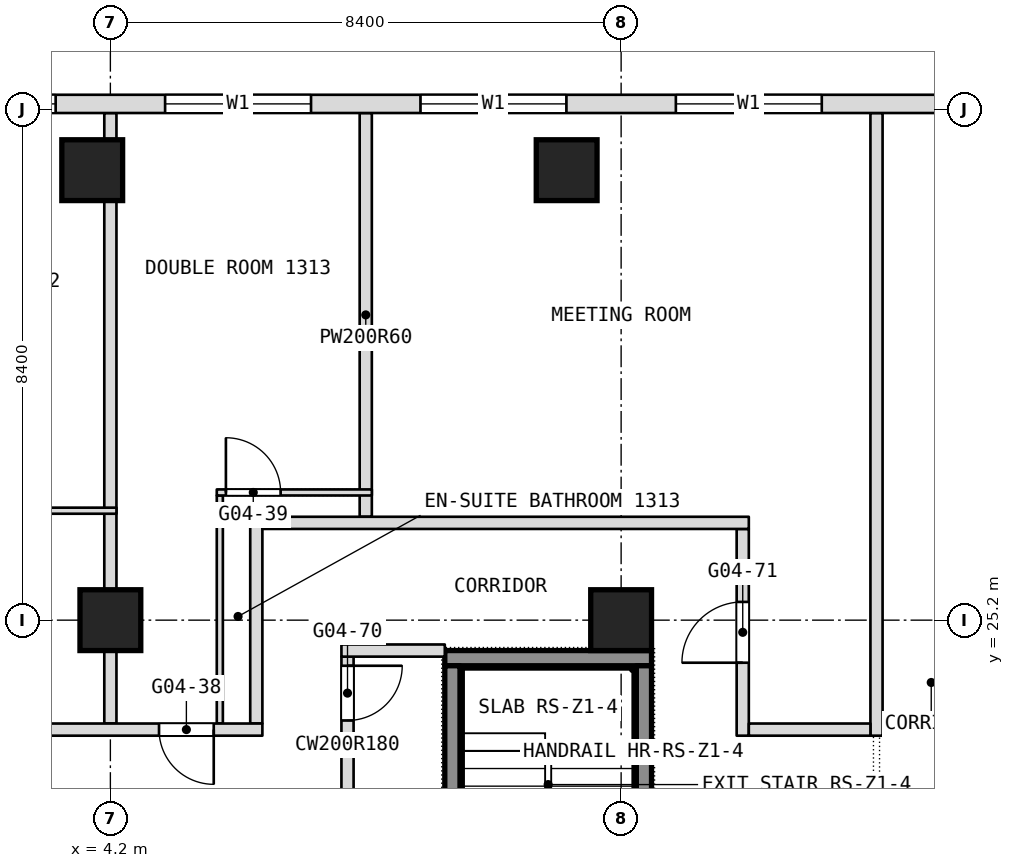
"""IFC4 building model, lengths in metres.
Left out: names, types, materials, properties, quantities, classifications, styles, units other than length and angle.
Written with IfcOpenShell. Run it as: python <this file> out.ifc"""

import sys

from ifc_helpers import new_model, si_unit, direction, frame, frame_2d, origin, origin_2d, place, context, subcontext, project, spatial, rectangle, extrude, element, fill, save


model = new_model("IFC4")
c1 = context("Model", 3, precision=1e-05, world=origin(), true_north=direction((0.0, 1.0)))
c2 = subcontext(c1, "Body", "Model", "MODEL_VIEW")
j1 = project(units=[si_unit("LENGTHUNIT", "METRE"), si_unit("PLANEANGLEUNIT", "RADIAN")], contexts=[c1])
p1 = place(None, origin())
s1 = spatial("IfcSite", under=j1, at=p1, CompositionType="ELEMENT")
p2 = place(p1, origin())
s2 = spatial("IfcBuilding", under=s1, at=p2, CompositionType="ELEMENT")
p3 = place(p2, frame((0.0, 0.0, 61.7)))
s3 = spatial("IfcBuildingStorey", under=s2, at=p3, CompositionType="ELEMENT", Elevation=61.7)
for number, where, z_axis, x_axis in (
    (1, (4.2, 25.2, 0.0), (0.0, 0.0, 1.0), (1.0, 0.0, 0.0)),
    (2, (12.6, 25.2, 0.0), (0.0, 0.0, 1.0), (1.0, 0.0, 0.0)),
    (3, (3.901, 32.6, 0.0), (0.0, 0.0, 1.0), (1.0, 0.0, 0.0)),
    (4, (11.704, 32.6, 0.0), (0.0, 0.0, 1.0), (1.0, 0.0, 0.0)),
):
    element("IfcColumn", number, at=place(p3, frame(where, z_axis=z_axis, x_axis=x_axis)), inside=s3, PredefinedType="COLUMN", context=c2, shape_type="SweptSolid", body=[
        extrude(rectangle(XDim=1.0, YDim=1.0, at=origin_2d()), origin(), (0.0, 0.0, 1.0), 3.6),
    ])
p4 = place(p3, frame((16.8, 23.3, 0.0), z_axis=(0.0, 0.0, 1.0), x_axis=(0.0, 1.0, 0.0)))
e5 = element("IfcWall", 5, at=p4, inside=s3, PredefinedType="PARTITIONING", context=c2, shape_type="SweptSolid", body=[
    extrude(rectangle(XDim=10.24, YDim=0.2, at=frame_2d((5.12, 0.0))), origin(), (0.0, 0.0, 1.0), 3.34),
])
p5 = place(p3, frame((14.6, 23.3, 0.0), z_axis=(0.0, 0.0, 1.0), x_axis=(0.0, 1.0, 0.0)))
e6 = element("IfcWall", 6, at=p5, inside=s3, PredefinedType="PARTITIONING", context=c2, shape_type="SweptSolid", body=[
    extrude(rectangle(XDim=3.4, YDim=0.2, at=frame_2d((1.7, 0.0))), origin(), (0.0, 0.0, 1.0), 3.34),
])
p6 = place(p5, frame((1.2, 0.0, 0.0)))
e7 = element("IfcOpeningElement", 7, at=p6, cuts=e6, PredefinedType="OPENING", context=c2, shape_type="SweptSolid", body=[
    extrude(rectangle(XDim=1.0, YDim=2.1, at=frame_2d((0.5, 1.05))), frame((0.0, 0.1, 0.0), z_axis=(0.0, -1.0, 0.0), x_axis=(1.0, 0.0, 0.0)), (0.0, 0.0, 1.0), 0.2),
])
p7 = place(p3, frame((8.4, 26.9, 0.0), z_axis=(0.0, 0.0, 1.0), x_axis=(0.0, 1.0, 0.0)))
e8 = element("IfcWall", 8, at=p7, inside=s3, PredefinedType="PARTITIONING", context=c2, shape_type="SweptSolid", body=[
    extrude(rectangle(XDim=6.64, YDim=0.2, at=frame_2d((3.32, 0.0))), origin(), (0.0, 0.0, 1.0), 3.34),
])
p8 = place(p3, frame((8.1, 21.7, 0.0), z_axis=(0.0, 0.0, 1.0), x_axis=(0.0, 1.0, 0.0)))
e9 = element("IfcWall", 9, at=p8, inside=s3, PredefinedType="PARTITIONING", context=c2, shape_type="SweptSolid", body=[
    extrude(rectangle(XDim=2.9, YDim=0.2, at=frame_2d((1.45, 0.0))), origin(), (0.0, 0.0, 1.0), 3.34),
])
p9 = place(p8, frame((1.85, 0.0, 0.0)))
e10 = element("IfcOpeningElement", 10, at=p9, cuts=e9, PredefinedType="OPENING", context=c2, shape_type="SweptSolid", body=[
    extrude(rectangle(XDim=0.9, YDim=2.1, at=frame_2d((0.45, 1.05))), frame((0.0, 0.1, 0.0), z_axis=(0.0, -1.0, 0.0), x_axis=(1.0, 0.0, 0.0)), (0.0, 0.0, 1.0), 0.2),
])
p10 = place(p3, frame((6.6, 23.5, 0.0), z_axis=(0.0, 0.0, 1.0), x_axis=(0.0, 1.0, 0.0)))
e11 = element("IfcWall", 11, at=p10, inside=s3, PredefinedType="PARTITIONING", context=c2, shape_type="SweptSolid", body=[
    extrude(rectangle(XDim=3.4, YDim=0.2, at=frame_2d((1.7, 0.0))), origin(), (0.0, 0.0, 1.0), 3.34),
])
p11 = place(p3, frame((6.0, 23.5, 0.0), z_axis=(0.0, 0.0, 1.0), x_axis=(0.0, 1.0, 0.0)))
e12 = element("IfcWall", 12, at=p11, inside=s3, PredefinedType="PARTITIONING", context=c2, shape_type="SweptSolid", body=[
    extrude(rectangle(XDim=3.75, YDim=0.1, at=frame_2d((1.875, 0.0))), origin(), (0.0, 0.0, 1.0), 3.34),
])
p12 = place(p3, frame((4.2, 23.5, 0.0), z_axis=(0.0, 0.0, 1.0), x_axis=(0.0, 1.0, 0.0)))
e13 = element("IfcWall", 13, at=p12, inside=s3, PredefinedType="PARTITIONING", context=c2, shape_type="SweptSolid", body=[
    extrude(rectangle(XDim=10.04, YDim=0.2, at=frame_2d((5.02, 0.0))), origin(), (0.0, 0.0, 1.0), 3.34),
])
p13 = place(p3, frame((-16.7, 23.4, 0.0), z_axis=(0.0, 0.0, 1.0), x_axis=(1.0, 0.0, 0.0)))
e14 = element("IfcWall", 14, at=p13, inside=s3, PredefinedType="PARTITIONING", context=c2, shape_type="SweptSolid", body=[
    extrude(rectangle(XDim=23.4, YDim=0.2, at=frame_2d((11.7, 0.0))), origin(), (0.0, 0.0, 1.0), 3.34),
])
p14 = place(p13, frame((2.4, 0.0, 0.0)))
e15 = element("IfcOpeningElement", 15, at=p14, cuts=e14, PredefinedType="OPENING", context=c2, shape_type="SweptSolid", body=[
    extrude(rectangle(XDim=0.9, YDim=2.1, at=frame_2d((0.45, 1.05))), frame((0.0, 0.1, 0.0), z_axis=(0.0, -1.0, 0.0), x_axis=(1.0, 0.0, 0.0)), (0.0, 0.0, 1.0), 0.2),
])
p15 = place(p13, frame((4.9, 0.0, 0.0)))
e16 = element("IfcOpeningElement", 16, at=p15, cuts=e14, PredefinedType="OPENING", context=c2, shape_type="SweptSolid", body=[
    extrude(rectangle(XDim=0.9, YDim=2.1, at=frame_2d((0.45, 1.05))), frame((0.0, 0.1, 0.0), z_axis=(0.0, -1.0, 0.0), x_axis=(1.0, 0.0, 0.0)), (0.0, 0.0, 1.0), 0.2),
])
p16 = place(p13, frame((10.8, 0.0, 0.0)))
e17 = element("IfcOpeningElement", 17, at=p16, cuts=e14, PredefinedType="OPENING", context=c2, shape_type="SweptSolid", body=[
    extrude(rectangle(XDim=0.9, YDim=2.1, at=frame_2d((0.45, 1.05))), frame((0.0, 0.1, 0.0), z_axis=(0.0, -1.0, 0.0), x_axis=(1.0, 0.0, 0.0)), (0.0, 0.0, 1.0), 0.2),
])
p17 = place(p13, frame((16.2, 0.0, 0.0)))
e18 = element("IfcOpeningElement", 18, at=p17, cuts=e14, PredefinedType="OPENING", context=c2, shape_type="SweptSolid", body=[
    extrude(rectangle(XDim=1.1, YDim=2.1, at=frame_2d((0.55, 1.05))), frame((0.0, 0.1, 0.0), z_axis=(0.0, -1.0, 0.0), x_axis=(1.0, 0.0, 0.0)), (0.0, 0.0, 1.0), 0.2),
])
p18 = place(p13, frame((21.7, 0.0, 0.0)))
e19 = element("IfcOpeningElement", 19, at=p18, cuts=e14, PredefinedType="OPENING", context=c2, shape_type="SweptSolid", body=[
    extrude(rectangle(XDim=0.9, YDim=2.1, at=frame_2d((0.45, 1.05))), frame((0.0, 0.1, 0.0), z_axis=(0.0, -1.0, 0.0), x_axis=(1.0, 0.0, 0.0)), (0.0, 0.0, 1.0), 0.2),
])
p19 = place(p3, frame((14.7, 23.4, 0.0), z_axis=(0.0, 0.0, 1.0), x_axis=(1.0, 0.0, 0.0)))
e20 = element("IfcWall", 20, at=p19, inside=s3, PredefinedType="PARTITIONING", context=c2, shape_type="SweptSolid", body=[
    extrude(rectangle(XDim=2.0, YDim=0.2, at=frame_2d((1.0, 0.0))), origin(), (0.0, 0.0, 1.0), 3.34),
])
p20 = place(p3, frame((8.0, 24.7, 0.0), z_axis=(0.0, 0.0, 1.0), x_axis=(1.0, 0.0, 0.0)))
e21 = element("IfcWall", 21, at=p20, inside=s3, PredefinedType="PARTITIONING", context=c2, shape_type="SweptSolid", body=[
    extrude(rectangle(XDim=1.7, YDim=0.2, at=frame_2d((0.85, 0.0))), origin(), (0.0, 0.0, 1.0), 3.34),
])
p21 = place(p3, frame((6.7, 26.8, 0.0), z_axis=(0.0, 0.0, 1.0), x_axis=(1.0, 0.0, 0.0)))
e22 = element("IfcWall", 22, at=p21, inside=s3, PredefinedType="PARTITIONING", context=c2, shape_type="SweptSolid", body=[
    extrude(rectangle(XDim=8.0, YDim=0.2, at=frame_2d((4.0, 0.0))), origin(), (0.0, 0.0, 1.0), 3.34),
])
p22 = place(p3, frame((1.75, 27.0, 0.0), z_axis=(0.0, 0.0, 1.0), x_axis=(1.0, 0.0, 0.0)))
e23 = element("IfcWall", 23, at=p22, inside=s3, PredefinedType="PARTITIONING", context=c2, shape_type="SweptSolid", body=[
    extrude(rectangle(XDim=2.55, YDim=0.1, at=frame_2d((1.275, 0.0))), origin(), (0.0, 0.0, 1.0), 3.34),
])
p23 = place(p22, frame((0.15, 0.0, 0.0)))
e24 = element("IfcOpeningElement", 24, at=p23, cuts=e23, PredefinedType="OPENING", context=c2, shape_type="SweptSolid", body=[
    extrude(rectangle(XDim=0.9, YDim=2.1, at=frame_2d((0.45, 1.05))), frame((0.0, 0.05, 0.0), z_axis=(0.0, -1.0, 0.0), x_axis=(1.0, 0.0, 0.0)), (0.0, 0.0, 1.0), 0.1),
])
p24 = place(p3, frame((5.95, 27.3, 0.0), z_axis=(0.0, 0.0, 1.0), x_axis=(1.0, 0.0, 0.0)))
e25 = element("IfcWall", 25, at=p24, inside=s3, PredefinedType="PARTITIONING", context=c2, shape_type="SweptSolid", body=[
    extrude(rectangle(XDim=2.55, YDim=0.1, at=frame_2d((1.275, 0.0))), origin(), (0.0, 0.0, 1.0), 3.34),
])
p25 = place(p24, frame((0.15, 0.0, 0.0)))
e26 = element("IfcOpeningElement", 26, at=p25, cuts=e25, PredefinedType="OPENING", context=c2, shape_type="SweptSolid", body=[
    extrude(rectangle(XDim=0.9, YDim=2.1, at=frame_2d((0.45, 1.05))), frame((0.0, 0.05, 0.0), z_axis=(0.0, -1.0, 0.0), x_axis=(1.0, 0.0, 0.0)), (0.0, 0.0, 1.0), 0.1),
])
p26 = place(p3, frame((23.406, 33.69, 0.0), z_axis=(0.0, 0.0, 1.0), x_axis=(-1.0, 0.0, 0.0)))
e27 = element("IfcWall", 27, at=p26, inside=s3, PredefinedType="NOTDEFINED", context=c2, shape_type="SweptSolid", body=[
    extrude(rectangle(XDim=46.812, YDim=0.3, at=frame_2d((23.406, 0.0))), origin(), (0.0, 0.0, 1.0), 3.6),
])
p27 = place(p26, frame((2.186, 0.0, 0.9)))
e28 = element("IfcOpeningElement", 28, at=p27, cuts=e27, PredefinedType="OPENING", context=c2, shape_type="SweptSolid", body=[
    extrude(rectangle(XDim=2.4, YDim=2.1, at=frame_2d((1.2, 1.05))), frame((0.0, 0.15, 0.0), z_axis=(0.0, -1.0, 0.0), x_axis=(1.0, 0.0, 0.0)), (0.0, 0.0, 1.0), 0.3),
])
p28 = place(p26, frame((7.506, 0.0, 0.9)))
e29 = element("IfcOpeningElement", 29, at=p28, cuts=e27, PredefinedType="OPENING", context=c2, shape_type="SweptSolid", body=[
    extrude(rectangle(XDim=2.4, YDim=2.1, at=frame_2d((1.2, 1.05))), frame((0.0, 0.15, 0.0), z_axis=(0.0, -1.0, 0.0), x_axis=(1.0, 0.0, 0.0)), (0.0, 0.0, 1.0), 0.3),
])
p29 = place(p26, frame((11.706, 0.0, 0.9)))
e30 = element("IfcOpeningElement", 30, at=p29, cuts=e27, PredefinedType="OPENING", context=c2, shape_type="SweptSolid", body=[
    extrude(rectangle(XDim=2.4, YDim=2.1, at=frame_2d((1.2, 1.05))), frame((0.0, 0.15, 0.0), z_axis=(0.0, -1.0, 0.0), x_axis=(1.0, 0.0, 0.0)), (0.0, 0.0, 1.0), 0.3),
])
p30 = place(p26, frame((15.906, 0.0, 0.9)))
e31 = element("IfcOpeningElement", 31, at=p30, cuts=e27, PredefinedType="OPENING", context=c2, shape_type="SweptSolid", body=[
    extrude(rectangle(XDim=2.4, YDim=2.1, at=frame_2d((1.2, 1.05))), frame((0.0, 0.15, 0.0), z_axis=(0.0, -1.0, 0.0), x_axis=(1.0, 0.0, 0.0)), (0.0, 0.0, 1.0), 0.3),
])
p31 = place(p26, frame((20.106, 0.0, 0.9)))
e32 = element("IfcOpeningElement", 32, at=p31, cuts=e27, PredefinedType="OPENING", context=c2, shape_type="SweptSolid", body=[
    extrude(rectangle(XDim=2.4, YDim=2.1, at=frame_2d((1.2, 1.05))), frame((0.0, 0.15, 0.0), z_axis=(0.0, -1.0, 0.0), x_axis=(1.0, 0.0, 0.0)), (0.0, 0.0, 1.0), 0.3),
])
p32 = place(p26, frame((24.306, 0.0, 0.9)))
e33 = element("IfcOpeningElement", 33, at=p32, cuts=e27, PredefinedType="OPENING", context=c2, shape_type="SweptSolid", body=[
    extrude(rectangle(XDim=2.4, YDim=2.1, at=frame_2d((1.2, 1.05))), frame((0.0, 0.15, 0.0), z_axis=(0.0, -1.0, 0.0), x_axis=(1.0, 0.0, 0.0)), (0.0, 0.0, 1.0), 0.3),
])
p33 = place(p26, frame((28.506, 0.0, 0.9)))
e34 = element("IfcOpeningElement", 34, at=p33, cuts=e27, PredefinedType="OPENING", context=c2, shape_type="SweptSolid", body=[
    extrude(rectangle(XDim=2.4, YDim=2.1, at=frame_2d((1.2, 1.05))), frame((0.0, 0.15, 0.0), z_axis=(0.0, -1.0, 0.0), x_axis=(1.0, 0.0, 0.0)), (0.0, 0.0, 1.0), 0.3),
])
p34 = place(p26, frame((32.706, 0.0, 0.9)))
e35 = element("IfcOpeningElement", 35, at=p34, cuts=e27, PredefinedType="OPENING", context=c2, shape_type="SweptSolid", body=[
    extrude(rectangle(XDim=2.4, YDim=2.1, at=frame_2d((1.2, 1.05))), frame((0.0, 0.15, 0.0), z_axis=(0.0, -1.0, 0.0), x_axis=(1.0, 0.0, 0.0)), (0.0, 0.0, 1.0), 0.3),
])
p35 = place(p26, frame((36.906, 0.0, 0.9)))
e36 = element("IfcOpeningElement", 36, at=p35, cuts=e27, PredefinedType="OPENING", context=c2, shape_type="SweptSolid", body=[
    extrude(rectangle(XDim=2.4, YDim=2.1, at=frame_2d((1.2, 1.05))), frame((0.0, 0.15, 0.0), z_axis=(0.0, -1.0, 0.0), x_axis=(1.0, 0.0, 0.0)), (0.0, 0.0, 1.0), 0.3),
])
p36 = place(p26, frame((42.226, 0.0, 0.9)))
e37 = element("IfcOpeningElement", 37, at=p36, cuts=e27, PredefinedType="OPENING", context=c2, shape_type="SweptSolid", body=[
    extrude(rectangle(XDim=2.4, YDim=2.1, at=frame_2d((1.2, 1.05))), frame((0.0, 0.15, 0.0), z_axis=(0.0, -1.0, 0.0), x_axis=(1.0, 0.0, 0.0)), (0.0, 0.0, 1.0), 0.3),
])
p37 = place(p3, frame((9.7, 24.575, 0.1), z_axis=(0.0, 0.0, 1.0), x_axis=(1.0, 0.0, 0.0)))
e38 = element("IfcWall", 38, at=p37, inside=s3, PredefinedType="SHEAR", context=c2, shape_type="SweptSolid", body=[
    extrude(rectangle(XDim=3.4, YDim=0.25, at=frame_2d((1.7, 0.0))), origin(), (0.0, 0.0, 1.0), 3.6),
])
p38 = place(p3, frame((9.825, 18.75, 0.1), z_axis=(0.0, 0.0, 1.0), x_axis=(0.0, 1.0, 0.0)))
e39 = element("IfcWall", 39, at=p38, inside=s3, PredefinedType="SHEAR", context=c2, shape_type="SweptSolid", body=[
    extrude(rectangle(XDim=5.7, YDim=0.25, at=frame_2d((2.85, 0.0))), origin(), (0.0, 0.0, 1.0), 3.6),
])
p39 = place(p38, frame((0.2, 0.0, 0.0)))
e40 = element("IfcOpeningElement", 40, at=p39, cuts=e39, PredefinedType="OPENING", context=c2, shape_type="SweptSolid", body=[
    extrude(rectangle(XDim=1.0, YDim=2.1, at=frame_2d((0.5, 1.05))), frame((0.0, 0.125, 0.0), z_axis=(0.0, -1.0, 0.0), x_axis=(1.0, 0.0, 0.0)), (0.0, 0.0, 1.0), 0.25),
])
p40 = place(p3, frame((12.975, 18.75, 0.1), z_axis=(0.0, 0.0, 1.0), x_axis=(0.0, 1.0, 0.0)))
e41 = element("IfcWall", 41, at=p40, inside=s3, PredefinedType="SHEAR", context=c2, shape_type="SweptSolid", body=[
    extrude(rectangle(XDim=5.7, YDim=0.25, at=frame_2d((2.85, 0.0))), origin(), (0.0, 0.0, 1.0), 3.6),
])
p41 = place(p6, origin())
e42 = element("IfcDoor", 42, at=p41, inside=s3, OperationType="SINGLE_SWING_LEFT", PredefinedType="DOOR", context=c2, shape_type="SweptSolid", body=[
    extrude(rectangle(XDim=1.0, YDim=2.1, at=frame_2d((0.5, 1.05))), frame((0.0, 0.025, 0.0), z_axis=(0.0, -1.0, 0.0), x_axis=(1.0, 0.0, 0.0)), (0.0, 0.0, 1.0), 0.05),
])
fill(e7, e42)
p42 = place(p9, origin())
e43 = element("IfcDoor", 43, at=p42, inside=s3, OperationType="SINGLE_SWING_LEFT", PredefinedType="DOOR", context=c2, shape_type="SweptSolid", body=[
    extrude(rectangle(XDim=0.9, YDim=2.1, at=frame_2d((0.45, 1.05))), frame((0.0, 0.025, 0.0), z_axis=(0.0, -1.0, 0.0), x_axis=(1.0, 0.0, 0.0)), (0.0, 0.0, 1.0), 0.05),
])
fill(e10, e43)
p43 = place(p18, origin())
e44 = element("IfcDoor", 44, at=p43, inside=s3, OperationType="SINGLE_SWING_RIGHT", PredefinedType="DOOR", context=c2, shape_type="SweptSolid", body=[
    extrude(rectangle(XDim=0.9, YDim=2.1, at=frame_2d((0.45, 1.05))), frame((0.0, 0.025, 0.0), z_axis=(0.0, -1.0, 0.0), x_axis=(1.0, 0.0, 0.0)), (0.0, 0.0, 1.0), 0.05),
])
fill(e19, e44)
p44 = place(p25, origin())
e45 = element("IfcDoor", 45, at=p44, inside=s3, OperationType="SINGLE_SWING_RIGHT", PredefinedType="DOOR", context=c2, shape_type="SweptSolid", body=[
    extrude(rectangle(XDim=0.9, YDim=2.1, at=frame_2d((0.45, 1.05))), frame((0.0, 0.025, 0.0), z_axis=(0.0, -1.0, 0.0), x_axis=(1.0, 0.0, 0.0)), (0.0, 0.0, 1.0), 0.05),
])
fill(e26, e45)
p45 = place(p28, origin())
e46 = element("IfcWindow", 46, at=p45, inside=s3, PartitioningType="SINGLE_PANEL", PredefinedType="WINDOW", context=c2, shape_type="SweptSolid", body=[
    extrude(rectangle(XDim=2.4, YDim=2.1, at=frame_2d((1.2, 1.05))), frame((0.0, 0.03, 0.0), z_axis=(0.0, -1.0, 0.0), x_axis=(1.0, 0.0, 0.0)), (0.0, 0.0, 1.0), 0.06),
])
fill(e29, e46)
p46 = place(p29, origin())
e47 = element("IfcWindow", 47, at=p46, inside=s3, PartitioningType="SINGLE_PANEL", PredefinedType="WINDOW", context=c2, shape_type="SweptSolid", body=[
    extrude(rectangle(XDim=2.4, YDim=2.1, at=frame_2d((1.2, 1.05))), frame((0.0, 0.03, 0.0), z_axis=(0.0, -1.0, 0.0), x_axis=(1.0, 0.0, 0.0)), (0.0, 0.0, 1.0), 0.06),
])
fill(e30, e47)
p47 = place(p30, origin())
e48 = element("IfcWindow", 48, at=p47, inside=s3, PartitioningType="SINGLE_PANEL", PredefinedType="WINDOW", context=c2, shape_type="SweptSolid", body=[
    extrude(rectangle(XDim=2.4, YDim=2.1, at=frame_2d((1.2, 1.05))), frame((0.0, 0.03, 0.0), z_axis=(0.0, -1.0, 0.0), x_axis=(1.0, 0.0, 0.0)), (0.0, 0.0, 1.0), 0.06),
])
fill(e31, e48)
p48 = place(p31, origin())
e49 = element("IfcWindow", 49, at=p48, inside=s3, PartitioningType="SINGLE_PANEL", PredefinedType="WINDOW", context=c2, shape_type="SweptSolid", body=[
    extrude(rectangle(XDim=2.4, YDim=2.1, at=frame_2d((1.2, 1.05))), frame((0.0, 0.03, 0.0), z_axis=(0.0, -1.0, 0.0), x_axis=(1.0, 0.0, 0.0)), (0.0, 0.0, 1.0), 0.06),
])
fill(e32, e49)
save(model, sys.argv[1])
